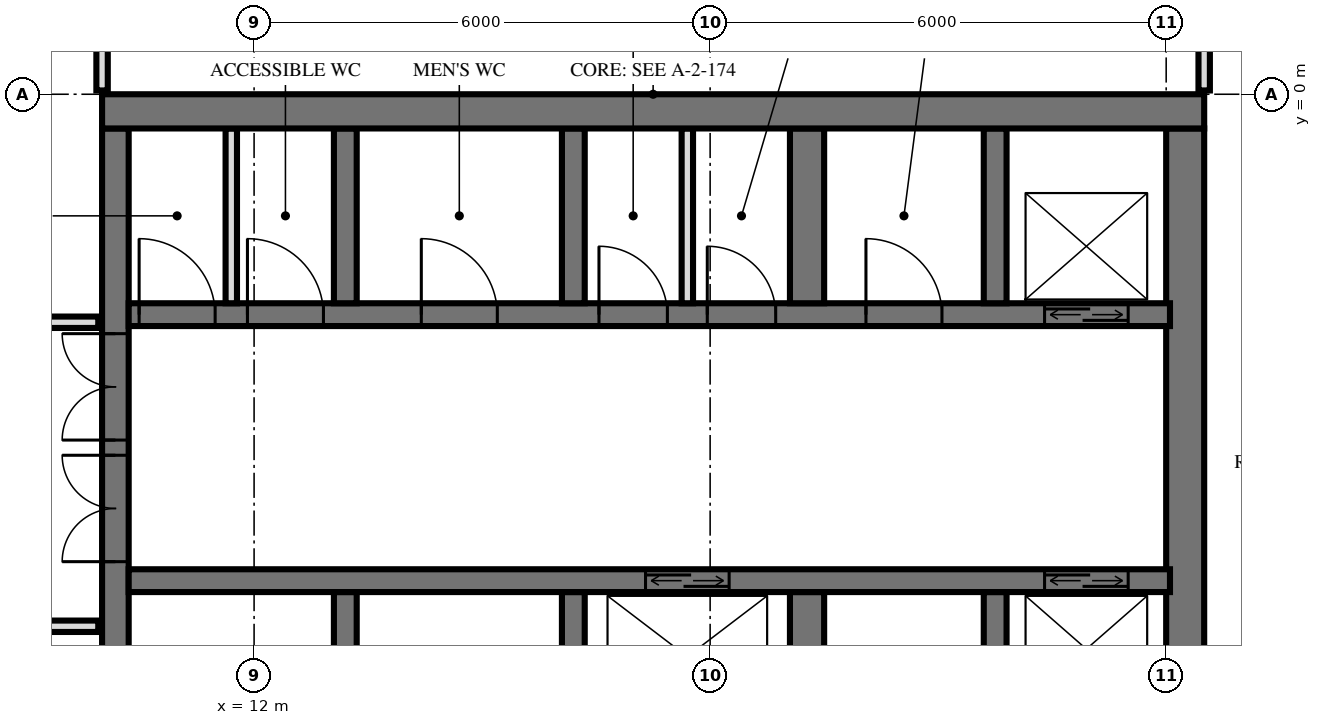
"""IFC4 building model, lengths in metres.
Left out: names, types, materials, properties, quantities, classifications, styles, units other than length and angle.
Written with IfcOpenShell. Run it as: python <this file> out.ifc"""

import sys

from ifc_helpers import new_model, si_unit, direction, frame, frame_2d, origin, place, context, subcontext, project, spatial, rectangle, extrude, element, fill, save


model = new_model("IFC4")
c1 = context("Model", 3, precision=1e-05, world=origin(), true_north=direction((0.0, 1.0)))
c2 = subcontext(c1, "Body", "Model", "MODEL_VIEW")
j1 = project(units=[si_unit("LENGTHUNIT", "METRE"), si_unit("PLANEANGLEUNIT", "RADIAN")], contexts=[c1])
p1 = place(None, origin())
s1 = spatial("IfcSite", under=j1, at=p1, CompositionType="ELEMENT")
p2 = place(p1, origin())
s2 = spatial("IfcBuilding", under=s1, at=p2, CompositionType="ELEMENT")
p3 = place(p2, frame((0.0, 0.0, 152.4)))
s3 = spatial("IfcBuildingStorey", under=s2, at=p3, CompositionType="ELEMENT", Elevation=152.4)
p4 = place(p3, frame((10.0, -0.225, 0.0), z_axis=(0.0, 0.0, 1.0), x_axis=(1.0, 0.0, 0.0)))
e1 = element("IfcWall", 1, at=p4, inside=s3, PredefinedType="SHEAR", context=c2, shape_type="SweptSolid", body=[
    extrude(rectangle(XDim=14.5, YDim=0.45, at=frame_2d((7.25, 0.0))), origin(), (0.0, 0.0, 1.0), 3.6),
])
p5 = place(p3, frame((10.175, -14.55, 0.0), z_axis=(0.0, 0.0, 1.0), x_axis=(0.0, 1.0, 0.0)))
e2 = element("IfcWall", 2, at=p5, inside=s3, PredefinedType="SHEAR", context=c2, shape_type="SweptSolid", body=[
    extrude(rectangle(XDim=14.1, YDim=0.35, at=frame_2d((7.05, 0.0))), origin(), (0.0, 0.0, 1.0), 3.6),
])
p6 = place(p5, frame((8.4, 0.0, 0.0)))
e3 = element("IfcOpeningElement", 3, at=p6, cuts=e2, PredefinedType="OPENING", context=c2, shape_type="SweptSolid", body=[
    extrude(rectangle(XDim=1.4, YDim=2.4, at=frame_2d((0.7, 1.2))), frame((0.0, 0.185, 0.0), z_axis=(0.0, -1.0, 0.0), x_axis=(1.0, 0.0, 0.0)), (0.0, 0.0, 1.0), 0.37),
])
p7 = place(p5, frame((10.0, 0.0, 0.0)))
e4 = element("IfcOpeningElement", 4, at=p7, cuts=e2, PredefinedType="OPENING", context=c2, shape_type="SweptSolid", body=[
    extrude(rectangle(XDim=1.4, YDim=2.4, at=frame_2d((0.7, 1.2))), frame((0.0, 0.185, 0.0), z_axis=(0.0, -1.0, 0.0), x_axis=(1.0, 0.0, 0.0)), (0.0, 0.0, 1.0), 0.37),
])
p8 = place(p5, frame((4.0, 0.0, 0.0)))
e5 = element("IfcOpeningElement", 5, at=p8, cuts=e2, PredefinedType="OPENING", context=c2, shape_type="SweptSolid", body=[
    extrude(rectangle(XDim=1.2, YDim=2.1, at=frame_2d((0.6, 1.05))), frame((0.0, 0.185, 0.0), z_axis=(0.0, -1.0, 0.0), x_axis=(1.0, 0.0, 0.0)), (0.0, 0.0, 1.0), 0.37),
])
p9 = place(p3, frame((24.25, -14.55, 0.0), z_axis=(0.0, 0.0, 1.0), x_axis=(0.0, 1.0, 0.0)))
e6 = element("IfcWall", 6, at=p9, inside=s3, PredefinedType="SHEAR", context=c2, shape_type="SweptSolid", body=[
    extrude(rectangle(XDim=14.1, YDim=0.5, at=frame_2d((7.05, 0.0))), origin(), (0.0, 0.0, 1.0), 3.6),
])
p10 = place(p3, frame((10.35, -2.9, 0.0), z_axis=(0.0, 0.0, 1.0), x_axis=(1.0, 0.0, 0.0)))
e7 = element("IfcWall", 7, at=p10, inside=s3, PredefinedType="SHEAR", context=c2, shape_type="SweptSolid", body=[
    extrude(rectangle(XDim=13.7, YDim=0.3, at=frame_2d((6.85, 0.0))), origin(), (0.0, 0.0, 1.0), 3.6),
])
p11 = place(p10, frame((12.05, 0.0, 0.0)))
e8 = element("IfcOpeningElement", 8, at=p11, cuts=e7, PredefinedType="OPENING", context=c2, shape_type="SweptSolid", body=[
    extrude(rectangle(XDim=1.1, YDim=2.1, at=frame_2d((0.55, 1.05))), frame((0.0, 0.16, 0.0), z_axis=(0.0, -1.0, 0.0), x_axis=(1.0, 0.0, 0.0)), (0.0, 0.0, 1.0), 0.32),
])
p12 = place(p10, frame((6.188, 0.0, 0.0)))
e9 = element("IfcOpeningElement", 9, at=p12, cuts=e7, PredefinedType="OPENING", context=c2, shape_type="SweptSolid", body=[
    extrude(rectangle(XDim=0.9, YDim=2.1, at=frame_2d((0.45, 1.05))), frame((0.0, 0.16, 0.0), z_axis=(0.0, -1.0, 0.0), x_axis=(1.0, 0.0, 0.0)), (0.0, 0.0, 1.0), 0.32),
])
p13 = place(p10, frame((7.613, 0.0, 0.0)))
e10 = element("IfcOpeningElement", 10, at=p13, cuts=e7, PredefinedType="OPENING", context=c2, shape_type="SweptSolid", body=[
    extrude(rectangle(XDim=0.9, YDim=2.1, at=frame_2d((0.45, 1.05))), frame((0.0, 0.16, 0.0), z_axis=(0.0, -1.0, 0.0), x_axis=(1.0, 0.0, 0.0)), (0.0, 0.0, 1.0), 0.32),
])
p14 = place(p10, frame((0.137, 0.0, 0.0)))
e11 = element("IfcOpeningElement", 11, at=p14, cuts=e7, PredefinedType="OPENING", context=c2, shape_type="SweptSolid", body=[
    extrude(rectangle(XDim=1.0, YDim=2.1, at=frame_2d((0.5, 1.05))), frame((0.0, 0.16, 0.0), z_axis=(0.0, -1.0, 0.0), x_axis=(1.0, 0.0, 0.0)), (0.0, 0.0, 1.0), 0.32),
])
p15 = place(p10, frame((1.562, 0.0, 0.0)))
e12 = element("IfcOpeningElement", 12, at=p15, cuts=e7, PredefinedType="OPENING", context=c2, shape_type="SweptSolid", body=[
    extrude(rectangle(XDim=1.0, YDim=2.1, at=frame_2d((0.5, 1.05))), frame((0.0, 0.16, 0.0), z_axis=(0.0, -1.0, 0.0), x_axis=(1.0, 0.0, 0.0)), (0.0, 0.0, 1.0), 0.32),
])
p16 = place(p10, frame((3.85, 0.0, 0.0)))
e13 = element("IfcOpeningElement", 13, at=p16, cuts=e7, PredefinedType="OPENING", context=c2, shape_type="SweptSolid", body=[
    extrude(rectangle(XDim=1.0, YDim=2.1, at=frame_2d((0.5, 1.05))), frame((0.0, 0.16, 0.0), z_axis=(0.0, -1.0, 0.0), x_axis=(1.0, 0.0, 0.0)), (0.0, 0.0, 1.0), 0.32),
])
p17 = place(p10, frame((9.7, 0.0, 0.0)))
e14 = element("IfcOpeningElement", 14, at=p17, cuts=e7, PredefinedType="OPENING", context=c2, shape_type="SweptSolid", body=[
    extrude(rectangle(XDim=1.0, YDim=2.1, at=frame_2d((0.5, 1.05))), frame((0.0, 0.16, 0.0), z_axis=(0.0, -1.0, 0.0), x_axis=(1.0, 0.0, 0.0)), (0.0, 0.0, 1.0), 0.32),
])
p18 = place(p3, frame((10.35, -6.4, 0.0), z_axis=(0.0, 0.0, 1.0), x_axis=(1.0, 0.0, 0.0)))
e15 = element("IfcWall", 15, at=p18, inside=s3, PredefinedType="SHEAR", context=c2, shape_type="SweptSolid", body=[
    extrude(rectangle(XDim=13.7, YDim=0.3, at=frame_2d((6.85, 0.0))), origin(), (0.0, 0.0, 1.0), 3.6),
])
p19 = place(p18, frame((12.05, 0.0, 0.0)))
e16 = element("IfcOpeningElement", 16, at=p19, cuts=e15, PredefinedType="OPENING", context=c2, shape_type="SweptSolid", body=[
    extrude(rectangle(XDim=1.1, YDim=2.1, at=frame_2d((0.55, 1.05))), frame((0.0, 0.16, 0.0), z_axis=(0.0, -1.0, 0.0), x_axis=(1.0, 0.0, 0.0)), (0.0, 0.0, 1.0), 0.32),
])
p20 = place(p18, frame((6.8, 0.0, 0.0)))
e17 = element("IfcOpeningElement", 17, at=p20, cuts=e15, PredefinedType="OPENING", context=c2, shape_type="SweptSolid", body=[
    extrude(rectangle(XDim=1.1, YDim=2.1, at=frame_2d((0.55, 1.05))), frame((0.0, 0.16, 0.0), z_axis=(0.0, -1.0, 0.0), x_axis=(1.0, 0.0, 0.0)), (0.0, 0.0, 1.0), 0.32),
])
for number, where, z_axis, x_axis in (
    (18, (13.2, -2.75, 0.0), (0.0, 0.0, 1.0), (0.0, 1.0, 0.0)),
    (19, (13.2, -8.85, 0.0), (0.0, 0.0, 1.0), (0.0, 1.0, 0.0)),
    (20, (16.2, -2.75, 0.0), (0.0, 0.0, 1.0), (0.0, 1.0, 0.0)),
    (21, (16.2, -8.85, 0.0), (0.0, 0.0, 1.0), (0.0, 1.0, 0.0)),
):
    element("IfcWall", number, at=place(p3, frame(where, z_axis=z_axis, x_axis=x_axis)), inside=s3, PredefinedType="SHEAR", context=c2, shape_type="SweptSolid", body=[
        extrude(rectangle(XDim=2.3, YDim=0.3, at=frame_2d((1.15, 0.0))), origin(), (0.0, 0.0, 1.0), 3.6),
    ])
for number, where, z_axis, x_axis in (
    (22, (19.275, -2.75, 0.0), (0.0, 0.0, 1.0), (0.0, 1.0, 0.0)),
    (23, (19.275, -8.85, 0.0), (0.0, 0.0, 1.0), (0.0, 1.0, 0.0)),
):
    element("IfcWall", number, at=place(p3, frame(where, z_axis=z_axis, x_axis=x_axis)), inside=s3, PredefinedType="SHEAR", context=c2, shape_type="SweptSolid", body=[
        extrude(rectangle(XDim=2.3, YDim=0.45, at=frame_2d((1.15, 0.0))), origin(), (0.0, 0.0, 1.0), 3.6),
    ])
for number, where, z_axis, x_axis in (
    (24, (21.75, -2.75, 0.0), (0.0, 0.0, 1.0), (0.0, 1.0, 0.0)),
    (25, (21.75, -8.85, 0.0), (0.0, 0.0, 1.0), (0.0, 1.0, 0.0)),
):
    element("IfcWall", number, at=place(p3, frame(where, z_axis=z_axis, x_axis=x_axis)), inside=s3, PredefinedType="SHEAR", context=c2, shape_type="SweptSolid", body=[
        extrude(rectangle(XDim=2.3, YDim=0.3, at=frame_2d((1.15, 0.0))), origin(), (0.0, 0.0, 1.0), 3.6),
    ])
for number, where, z_axis, x_axis in (
    (26, (17.7, -2.75, 0.0), (0.0, 0.0, 1.0), (0.0, 1.0, 0.0)),
    (27, (11.7, -2.75, 0.0), (0.0, 0.0, 1.0), (0.0, 1.0, 0.0)),
):
    element("IfcWall", number, at=place(p3, frame(where, z_axis=z_axis, x_axis=x_axis)), inside=s3, PredefinedType="PARTITIONING", context=c2, shape_type="SweptSolid", body=[
        extrude(rectangle(XDim=2.3, YDim=0.15, at=frame_2d((1.15, 0.0))), origin(), (0.0, 0.0, 1.0), 3.3),
    ])
p21 = place(p3, frame((24.5, 0.05, 0.0), z_axis=(0.0, 0.0, 1.0), x_axis=(0.0, 1.0, 0.0)))
e28 = element("IfcWall", 28, at=p21, inside=s3, PredefinedType="PARTITIONING", context=c2, shape_type="SweptSolid", body=[
    extrude(rectangle(XDim=0.807, YDim=0.15, at=frame_2d((0.404, 0.0))), origin(), (0.0, 0.0, 1.0), 3.32),
])
p22 = place(p3, frame((10.0, 0.05, 0.0), z_axis=(0.0, 0.0, 1.0), x_axis=(0.0, 1.0, 0.0)))
e29 = element("IfcWall", 29, at=p22, inside=s3, PredefinedType="PARTITIONING", context=c2, shape_type="SweptSolid", body=[
    extrude(rectangle(XDim=0.97, YDim=0.15, at=frame_2d((0.485, 0.0))), origin(), (0.0, 0.0, 1.0), 3.32),
])
p23 = place(p3, frame((-9.95, -7.0, 0.0), z_axis=(0.0, 0.0, 1.0), x_axis=(1.0, 0.0, 0.0)))
e30 = element("IfcWall", 30, at=p23, inside=s3, PredefinedType="PARTITIONING", context=c2, shape_type="SweptSolid", body=[
    extrude(rectangle(XDim=19.9, YDim=0.15, at=frame_2d((9.95, 0.0))), origin(), (0.0, 0.0, 1.0), 3.32),
])
p24 = place(p23, frame((9.45, 0.0, 0.0)))
e31 = element("IfcOpeningElement", 31, at=p24, cuts=e30, PredefinedType="OPENING", context=c2, shape_type="SweptSolid", body=[
    extrude(rectangle(XDim=1.0, YDim=2.1, at=frame_2d((0.5, 1.05))), frame((0.0, 0.085, 0.0), z_axis=(0.0, -1.0, 0.0), x_axis=(1.0, 0.0, 0.0)), (0.0, 0.0, 1.0), 0.17),
])
p25 = place(p23, frame((15.45, 0.0, 0.0)))
e32 = element("IfcOpeningElement", 32, at=p25, cuts=e30, PredefinedType="OPENING", context=c2, shape_type="SweptSolid", body=[
    extrude(rectangle(XDim=1.0, YDim=2.1, at=frame_2d((0.5, 1.05))), frame((0.0, 0.085, 0.0), z_axis=(0.0, -1.0, 0.0), x_axis=(1.0, 0.0, 0.0)), (0.0, 0.0, 1.0), 0.17),
])
p26 = place(p3, frame((-9.95, -3.0, 0.0), z_axis=(0.0, 0.0, 1.0), x_axis=(1.0, 0.0, 0.0)))
e33 = element("IfcWall", 33, at=p26, inside=s3, PredefinedType="PARTITIONING", context=c2, shape_type="SweptSolid", body=[
    extrude(rectangle(XDim=19.9, YDim=0.15, at=frame_2d((9.95, 0.0))), origin(), (0.0, 0.0, 1.0), 3.32),
])
p27 = place(p26, frame((0.95, 0.0, 0.0)))
e34 = element("IfcOpeningElement", 34, at=p27, cuts=e33, PredefinedType="OPENING", context=c2, shape_type="SweptSolid", body=[
    extrude(rectangle(XDim=1.0, YDim=2.1, at=frame_2d((0.5, 1.05))), frame((0.0, 0.085, 0.0), z_axis=(0.0, -1.0, 0.0), x_axis=(1.0, 0.0, 0.0)), (0.0, 0.0, 1.0), 0.17),
])
p28 = place(p26, frame((3.7, 0.0, 0.0)))
e35 = element("IfcOpeningElement", 35, at=p28, cuts=e33, PredefinedType="OPENING", context=c2, shape_type="SweptSolid", body=[
    extrude(rectangle(XDim=1.0, YDim=2.1, at=frame_2d((0.5, 1.05))), frame((0.0, 0.085, 0.0), z_axis=(0.0, -1.0, 0.0), x_axis=(1.0, 0.0, 0.0)), (0.0, 0.0, 1.0), 0.17),
])
p29 = place(p26, frame((7.95, 0.0, 0.0)))
e36 = element("IfcOpeningElement", 36, at=p29, cuts=e33, PredefinedType="OPENING", context=c2, shape_type="SweptSolid", body=[
    extrude(rectangle(XDim=1.0, YDim=2.1, at=frame_2d((0.5, 1.05))), frame((0.0, 0.085, 0.0), z_axis=(0.0, -1.0, 0.0), x_axis=(1.0, 0.0, 0.0)), (0.0, 0.0, 1.0), 0.17),
])
p30 = place(p26, frame((15.2, 0.0, 0.0)))
e37 = element("IfcOpeningElement", 37, at=p30, cuts=e33, PredefinedType="OPENING", context=c2, shape_type="SweptSolid", body=[
    extrude(rectangle(XDim=1.0, YDim=2.1, at=frame_2d((0.5, 1.05))), frame((0.0, 0.085, 0.0), z_axis=(0.0, -1.0, 0.0), x_axis=(1.0, 0.0, 0.0)), (0.0, 0.0, 1.0), 0.17),
])
p31 = place(p11, origin())
e38 = element("IfcDoor", 38, at=p31, inside=s3, OperationType="DOUBLE_DOOR_SLIDING", PredefinedType="USERDEFINED", context=c2, shape_type="SweptSolid", body=[
    extrude(rectangle(XDim=1.1, YDim=2.1, at=frame_2d((0.55, 1.05))), frame((0.0, 0.025, 0.0), z_axis=(0.0, -1.0, 0.0), x_axis=(1.0, 0.0, 0.0)), (0.0, 0.0, 1.0), 0.05),
])
fill(e8, e38)
p32 = place(p19, origin())
e39 = element("IfcDoor", 39, at=p32, inside=s3, OperationType="DOUBLE_DOOR_SLIDING", PredefinedType="USERDEFINED", context=c2, shape_type="SweptSolid", body=[
    extrude(rectangle(XDim=1.1, YDim=2.1, at=frame_2d((0.55, 1.05))), frame((0.0, 0.025, 0.0), z_axis=(0.0, -1.0, 0.0), x_axis=(1.0, 0.0, 0.0)), (0.0, 0.0, 1.0), 0.05),
])
fill(e16, e39)
p33 = place(p20, origin())
e40 = element("IfcDoor", 40, at=p33, inside=s3, OperationType="DOUBLE_DOOR_SLIDING", PredefinedType="USERDEFINED", context=c2, shape_type="SweptSolid", body=[
    extrude(rectangle(XDim=1.1, YDim=2.1, at=frame_2d((0.55, 1.05))), frame((0.0, 0.025, 0.0), z_axis=(0.0, -1.0, 0.0), x_axis=(1.0, 0.0, 0.0)), (0.0, 0.0, 1.0), 0.05),
])
fill(e17, e40)
p34 = place(p6, origin())
e41 = element("IfcDoor", 41, at=p34, inside=s3, OperationType="DOUBLE_DOOR_SINGLE_SWING", PredefinedType="DOOR", context=c2, shape_type="SweptSolid", body=[
    extrude(rectangle(XDim=1.4, YDim=2.4, at=frame_2d((0.7, 1.2))), frame((0.0, 0.025, 0.0), z_axis=(0.0, -1.0, 0.0), x_axis=(1.0, 0.0, 0.0)), (0.0, 0.0, 1.0), 0.05),
])
fill(e3, e41)
p35 = place(p7, origin())
e42 = element("IfcDoor", 42, at=p35, inside=s3, OperationType="DOUBLE_DOOR_SINGLE_SWING", PredefinedType="DOOR", context=c2, shape_type="SweptSolid", body=[
    extrude(rectangle(XDim=1.4, YDim=2.4, at=frame_2d((0.7, 1.2))), frame((0.0, 0.025, 0.0), z_axis=(0.0, -1.0, 0.0), x_axis=(1.0, 0.0, 0.0)), (0.0, 0.0, 1.0), 0.05),
])
fill(e4, e42)
p36 = place(p12, origin())
e43 = element("IfcDoor", 43, at=p36, inside=s3, OperationType="SINGLE_SWING_RIGHT", PredefinedType="DOOR", context=c2, shape_type="SweptSolid", body=[
    extrude(rectangle(XDim=0.9, YDim=2.1, at=frame_2d((0.45, 1.05))), frame((0.0, 0.025, 0.0), z_axis=(0.0, -1.0, 0.0), x_axis=(1.0, 0.0, 0.0)), (0.0, 0.0, 1.0), 0.05),
])
fill(e9, e43)
p37 = place(p13, origin())
e44 = element("IfcDoor", 44, at=p37, inside=s3, OperationType="SINGLE_SWING_RIGHT", PredefinedType="DOOR", context=c2, shape_type="SweptSolid", body=[
    extrude(rectangle(XDim=0.9, YDim=2.1, at=frame_2d((0.45, 1.05))), frame((0.0, 0.025, 0.0), z_axis=(0.0, -1.0, 0.0), x_axis=(1.0, 0.0, 0.0)), (0.0, 0.0, 1.0), 0.05),
])
fill(e10, e44)
p38 = place(p14, origin())
e45 = element("IfcDoor", 45, at=p38, inside=s3, OperationType="SINGLE_SWING_RIGHT", PredefinedType="DOOR", context=c2, shape_type="SweptSolid", body=[
    extrude(rectangle(XDim=1.0, YDim=2.1, at=frame_2d((0.5, 1.05))), frame((0.0, 0.025, 0.0), z_axis=(0.0, -1.0, 0.0), x_axis=(1.0, 0.0, 0.0)), (0.0, 0.0, 1.0), 0.05),
])
fill(e11, e45)
p39 = place(p15, origin())
e46 = element("IfcDoor", 46, at=p39, inside=s3, OperationType="SINGLE_SWING_RIGHT", PredefinedType="DOOR", context=c2, shape_type="SweptSolid", body=[
    extrude(rectangle(XDim=1.0, YDim=2.1, at=frame_2d((0.5, 1.05))), frame((0.0, 0.025, 0.0), z_axis=(0.0, -1.0, 0.0), x_axis=(1.0, 0.0, 0.0)), (0.0, 0.0, 1.0), 0.05),
])
fill(e12, e46)
p40 = place(p16, origin())
e47 = element("IfcDoor", 47, at=p40, inside=s3, OperationType="SINGLE_SWING_RIGHT", PredefinedType="DOOR", context=c2, shape_type="SweptSolid", body=[
    extrude(rectangle(XDim=1.0, YDim=2.1, at=frame_2d((0.5, 1.05))), frame((0.0, 0.025, 0.0), z_axis=(0.0, -1.0, 0.0), x_axis=(1.0, 0.0, 0.0)), (0.0, 0.0, 1.0), 0.05),
])
fill(e13, e47)
p41 = place(p17, origin())
e48 = element("IfcDoor", 48, at=p41, inside=s3, OperationType="SINGLE_SWING_RIGHT", PredefinedType="DOOR", context=c2, shape_type="SweptSolid", body=[
    extrude(rectangle(XDim=1.0, YDim=2.1, at=frame_2d((0.5, 1.05))), frame((0.0, 0.025, 0.0), z_axis=(0.0, -1.0, 0.0), x_axis=(1.0, 0.0, 0.0)), (0.0, 0.0, 1.0), 0.05),
])
fill(e14, e48)
save(model, sys.argv[1])
